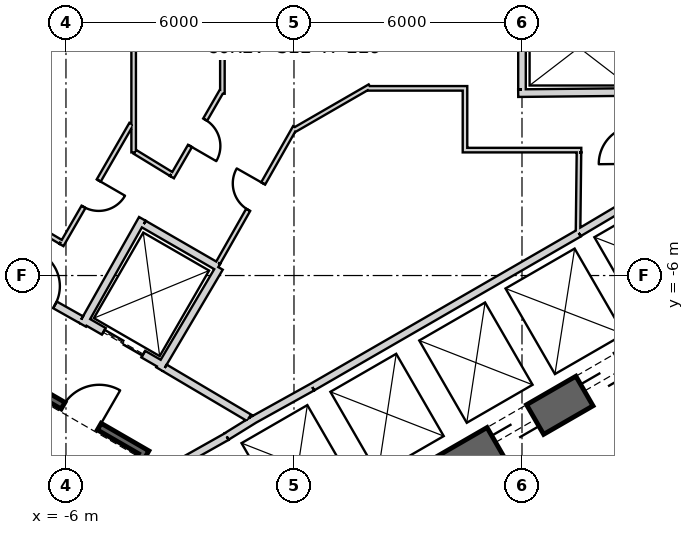
"""IFC4 building model, lengths in metres.
Left out: names, types, materials, properties, quantities, classifications, styles, units other than length and angle.
Written with IfcOpenShell. Run it as: python <this file> out.ifc"""

import sys

from ifc_helpers import new_model, si_unit, direction, frame, frame_2d, origin, place, context, subcontext, project, spatial, rectangle, extrude, element, fill, save


model = new_model("IFC4")
c1 = context("Model", 3, precision=1e-05, world=origin(), true_north=direction((0.0, 1.0)))
c2 = subcontext(c1, "Body", "Model", "MODEL_VIEW")
j1 = project(units=[si_unit("LENGTHUNIT", "METRE"), si_unit("PLANEANGLEUNIT", "RADIAN")], contexts=[c1])
p1 = place(None, origin())
s1 = spatial("IfcSite", under=j1, at=p1, CompositionType="ELEMENT")
p2 = place(p1, origin())
s2 = spatial("IfcBuilding", under=s1, at=p2, CompositionType="ELEMENT")
p3 = place(p2, frame((0.0, 0.0, 265.2)))
s3 = spatial("IfcBuildingStorey", under=s2, at=p3, CompositionType="ELEMENT", Elevation=265.2)
p4 = place(p3, frame((-7.825, -17.97, 0.0), z_axis=(0.0, 0.0, 1.0), x_axis=(0.866028369851, 0.499994862586, 0.0)))
e1 = element("IfcWall", 1, at=p4, inside=s3, PredefinedType="SHEAR", context=c2, shape_type="SweptSolid", body=[
    extrude(rectangle(XDim=31.523, YDim=0.9, at=frame_2d((15.762, 0.0))), origin(), (0.0, 0.0, 1.0), 4.0),
])
p5 = place(p4, frame((7.062, 0.0, 0.0)))
e2 = element("IfcOpeningElement", 2, at=p5, cuts=e1, PredefinedType="OPENING", context=c2, shape_type="SweptSolid", body=[
    extrude(rectangle(XDim=1.2, YDim=2.4, at=frame_2d((0.6, 1.2))), frame((0.0, 0.46, 0.0), z_axis=(0.0, -1.0, 0.0), x_axis=(1.0, 0.0, 0.0)), (0.0, 0.0, 1.0), 0.92),
])
p6 = place(p4, frame((9.762, 0.0, 0.0)))
e3 = element("IfcOpeningElement", 3, at=p6, cuts=e1, PredefinedType="OPENING", context=c2, shape_type="SweptSolid", body=[
    extrude(rectangle(XDim=1.2, YDim=2.4, at=frame_2d((0.6, 1.2))), frame((0.0, 0.46, 0.0), z_axis=(0.0, -1.0, 0.0), x_axis=(1.0, 0.0, 0.0)), (0.0, 0.0, 1.0), 0.92),
])
p7 = place(p4, frame((12.462, 0.0, 0.0)))
e4 = element("IfcOpeningElement", 4, at=p7, cuts=e1, PredefinedType="OPENING", context=c2, shape_type="SweptSolid", body=[
    extrude(rectangle(XDim=1.2, YDim=2.4, at=frame_2d((0.6, 1.2))), frame((0.0, 0.46, 0.0), z_axis=(0.0, -1.0, 0.0), x_axis=(1.0, 0.0, 0.0)), (0.0, 0.0, 1.0), 0.92),
])
p8 = place(p4, frame((15.162, 0.0, 0.0)))
e5 = element("IfcOpeningElement", 5, at=p8, cuts=e1, PredefinedType="OPENING", context=c2, shape_type="SweptSolid", body=[
    extrude(rectangle(XDim=1.2, YDim=2.4, at=frame_2d((0.6, 1.2))), frame((0.0, 0.46, 0.0), z_axis=(0.0, -1.0, 0.0), x_axis=(1.0, 0.0, 0.0)), (0.0, 0.0, 1.0), 0.92),
])
p9 = place(p4, frame((17.862, 0.0, 0.0)))
e6 = element("IfcOpeningElement", 6, at=p9, cuts=e1, PredefinedType="OPENING", context=c2, shape_type="SweptSolid", body=[
    extrude(rectangle(XDim=1.2, YDim=2.4, at=frame_2d((0.6, 1.2))), frame((0.0, 0.46, 0.0), z_axis=(0.0, -1.0, 0.0), x_axis=(1.0, 0.0, 0.0)), (0.0, 0.0, 1.0), 0.92),
])
p10 = place(p4, frame((20.562, 0.0, 0.0)))
e7 = element("IfcOpeningElement", 7, at=p10, cuts=e1, PredefinedType="OPENING", context=c2, shape_type="SweptSolid", body=[
    extrude(rectangle(XDim=1.2, YDim=2.4, at=frame_2d((0.6, 1.2))), frame((0.0, 0.46, 0.0), z_axis=(0.0, -1.0, 0.0), x_axis=(1.0, 0.0, 0.0)), (0.0, 0.0, 1.0), 0.92),
])
p11 = place(p4, frame((26.712, 0.0, 0.0)))
e8 = element("IfcOpeningElement", 8, at=p11, cuts=e1, PredefinedType="OPENING", context=c2, shape_type="SweptSolid", body=[
    extrude(rectangle(XDim=1.2, YDim=2.4, at=frame_2d((0.6, 1.2))), frame((0.0, 0.46, 0.0), z_axis=(0.0, -1.0, 0.0), x_axis=(1.0, 0.0, 0.0)), (0.0, 0.0, 1.0), 0.92),
])
p12 = place(p4, frame((3.612, 0.0, 0.0)))
e9 = element("IfcOpeningElement", 9, at=p12, cuts=e1, PredefinedType="OPENING", context=c2, shape_type="SweptSolid", body=[
    extrude(rectangle(XDim=1.2, YDim=2.4, at=frame_2d((0.6, 1.2))), frame((0.0, 0.46, 0.0), z_axis=(0.0, -1.0, 0.0), x_axis=(1.0, 0.0, 0.0)), (0.0, 0.0, 1.0), 0.92),
])
p13 = place(p3, frame((0.483, -8.936, 0.0), z_axis=(0.0, 0.0, 1.0), x_axis=(0.866030989016, 0.499990325971, 0.0)))
e10 = element("IfcWall", 10, at=p13, inside=s3, PredefinedType="PLUMBINGWALL", context=c2, shape_type="SweptSolid", body=[
    extrude(rectangle(XDim=8.1, YDim=0.2, at=frame_2d((4.05, 0.0))), origin(), (0.0, 0.0, 1.0), 3.7),
])
p14 = place(p3, frame((7.493, -4.878, 0.0), z_axis=(0.0, 0.0, 1.0), x_axis=(0.859981807212, 0.510324691999, 0.0)))
e11 = element("IfcWall", 11, at=p14, inside=s3, PredefinedType="PLUMBINGWALL", context=c2, shape_type="SweptSolid", body=[
    extrude(rectangle(XDim=1.845, YDim=0.2, at=frame_2d((0.922, 0.0))), origin(), (0.0, 0.0, 1.0), 3.7),
])
p15 = place(p3, frame((-1.769, -10.237, 0.0), z_axis=(0.0, 0.0, 1.0), x_axis=(-0.871534483978, -0.490334215854, 0.0)))
e12 = element("IfcWall", 12, at=p15, inside=s3, PredefinedType="PLUMBINGWALL", context=c2, shape_type="SweptSolid", body=[
    extrude(rectangle(XDim=2.7, YDim=0.2, at=frame_2d((1.35, 0.0))), origin(), (0.0, 0.0, 1.0), 3.7),
])
p16 = place(p3, frame((-1.024, -9.771, 0.0), z_axis=(0.0, 0.0, 1.0), x_axis=(-0.850348075135, -0.526220629693, 0.0)))
e13 = element("IfcWall", 13, at=p16, inside=s3, PredefinedType="PLUMBINGWALL", context=c2, shape_type="SweptSolid", body=[
    extrude(rectangle(XDim=0.878, YDim=0.2, at=frame_2d((0.439, 0.0))), origin(), (0.0, 0.0, 1.0), 3.7),
])
p17 = place(p3, frame((-1.13, -9.831, 0.0), z_axis=(0.0, 0.0, 1.0), x_axis=(0.874269620932, 0.485440655401, 0.0)))
e14 = element("IfcWall", 14, at=p17, inside=s3, PredefinedType="PLUMBINGWALL", context=c2, shape_type="SweptSolid", body=[
    extrude(rectangle(XDim=1.845, YDim=0.2, at=frame_2d((0.922, 0.0))), origin(), (0.0, 0.0, 1.0), 3.7),
])
p18 = place(p3, frame((5.9, -1.201, 0.0), z_axis=(0.0, 0.0, 1.0), x_axis=(0.999950064753, 0.009993397809, 0.0)))
e15 = element("IfcWall", 15, at=p18, inside=s3, PredefinedType="PLUMBINGWALL", context=c2, shape_type="SweptSolid", body=[
    extrude(rectangle(XDim=3.2, YDim=0.2, at=frame_2d((1.6, 0.0))), origin(), (0.0, 0.0, 1.0), 3.7),
])
p19 = place(p3, frame((6.0, -1.1, 0.0), z_axis=(0.0, 0.0, 1.0), x_axis=(0.0, 1.0, 0.0)))
e16 = element("IfcWall", 16, at=p19, inside=s3, PredefinedType="PLUMBINGWALL", context=c2, shape_type="SweptSolid", body=[
    extrude(rectangle(XDim=2.28, YDim=0.2, at=frame_2d((1.14, 0.0))), origin(), (0.0, 0.0, 1.0), 3.7),
])
p20 = place(p3, frame((-3.905, -10.563, -0.3), z_axis=(0.0, 0.0, 1.0), x_axis=(-0.500012932018, -0.866017937352, 0.0)))
e17 = element("IfcWall", 17, at=p20, inside=s3, PredefinedType="SHEAR", context=c2, shape_type="SweptSolid", body=[
    extrude(rectangle(XDim=8.1, YDim=0.2, at=frame_2d((4.05, 0.0))), origin(), (0.0, 0.0, 1.0), 4.0),
])
p21 = place(p3, frame((-4.041, -10.599, -0.3), z_axis=(0.0, 0.0, 1.0), x_axis=(-0.866047807691, 0.499961193289, 0.0)))
e18 = element("IfcWall", 18, at=p21, inside=s3, PredefinedType="SHEAR", context=c2, shape_type="SweptSolid", body=[
    extrude(rectangle(XDim=3.6, YDim=0.2, at=frame_2d((1.8, 0.0))), origin(), (0.0, 0.0, 1.0), 4.0),
])
p22 = place(p21, frame((1.25, 0.0, 0.3)))
e19 = element("IfcOpeningElement", 19, at=p22, cuts=e18, PredefinedType="OPENING", context=c2, shape_type="SweptSolid", body=[
    extrude(rectangle(XDim=1.1, YDim=2.1, at=frame_2d((0.55, 1.05))), frame((0.0, 0.11, 0.0), z_axis=(0.0, -1.0, 0.0), x_axis=(1.0, 0.0, 0.0)), (0.0, 0.0, 1.0), 0.22),
])
p23 = place(p3, frame((-3.446, -8.368, 0.0), z_axis=(0.0, 0.0, 1.0), x_axis=(-0.866024647952, 0.500001309137, 0.0)))
e20 = element("IfcWall", 20, at=p23, inside=s3, PredefinedType="PLUMBINGWALL", context=c2, shape_type="SweptSolid", body=[
    extrude(rectangle(XDim=2.4, YDim=0.2, at=frame_2d((1.2, 0.0))), origin(), (0.0, 0.0, 1.0), 3.7),
])
p24 = place(p23, frame((0.6, 0.0, 0.0)))
e21 = element("IfcOpeningElement", 21, at=p24, cuts=e20, PredefinedType="OPENING", context=c2, shape_type="SweptSolid", body=[
    extrude(rectangle(XDim=1.2, YDim=2.4, at=frame_2d((0.6, 1.2))), frame((0.0, 0.11, 0.0), z_axis=(0.0, -1.0, 0.0), x_axis=(1.0, 0.0, 0.0)), (0.0, 0.0, 1.0), 0.22),
])
p25 = place(p3, frame((-1.961, -5.796, 0.0), z_axis=(0.0, 0.0, 1.0), x_axis=(-0.508647062354, -0.860975125052, 0.0)))
e22 = element("IfcWall", 22, at=p25, inside=s3, PredefinedType="PLUMBINGWALL", context=c2, shape_type="SweptSolid", body=[
    extrude(rectangle(XDim=3.1, YDim=0.2, at=frame_2d((1.55, 0.0))), origin(), (0.0, 0.0, 1.0), 3.7),
])
p26 = place(p3, frame((-3.99, -4.509, 0.0), z_axis=(0.0, 0.0, 1.0), x_axis=(-0.491358283181, -0.870957540612, 0.0)))
e23 = element("IfcWall", 23, at=p26, inside=s3, PredefinedType="PLUMBINGWALL", context=c2, shape_type="SweptSolid", body=[
    extrude(rectangle(XDim=3.2, YDim=0.2, at=frame_2d((1.6, 0.0))), origin(), (0.0, 0.0, 1.0), 3.7),
])
p27 = place(p3, frame((-3.953, -4.646, 0.0), z_axis=(0.0, 0.0, 1.0), x_axis=(0.866065302921, -0.4999308863, 0.0)))
e24 = element("IfcWall", 24, at=p27, inside=s3, PredefinedType="PLUMBINGWALL", context=c2, shape_type="SweptSolid", body=[
    extrude(rectangle(XDim=2.264, YDim=0.2, at=frame_2d((1.132, 0.0))), origin(), (0.0, 0.0, 1.0), 3.7),
])
p28 = place(p3, frame((-3.401, -8.43, 0.0), z_axis=(0.0, 0.0, 1.0), x_axis=(0.860615607571, -0.509255118781, 0.0)))
e25 = element("IfcWall", 25, at=p28, inside=s3, PredefinedType="PARTITIONING", context=c2, shape_type="SweptSolid", body=[
    extrude(rectangle(XDim=2.581, YDim=0.2, at=frame_2d((1.29, 0.0))), origin(), (0.0, 0.0, 1.0), 3.7),
])
p29 = place(p3, frame((-7.849, -5.894, 0.0), z_axis=(0.0, 0.0, 1.0), x_axis=(0.871363259478, -0.490638431059, 0.0)))
e26 = element("IfcWall", 26, at=p29, inside=s3, PredefinedType="PARTITIONING", context=c2, shape_type="SweptSolid", body=[
    extrude(rectangle(XDim=2.581, YDim=0.2, at=frame_2d((1.291, 0.0))), origin(), (0.0, 0.0, 1.0), 3.7),
])
p30 = place(p29, frame((0.791, 0.0, 0.0)))
e27 = element("IfcOpeningElement", 27, at=p30, cuts=e26, PredefinedType="OPENING", context=c2, shape_type="SweptSolid", body=[
    extrude(rectangle(XDim=1.0, YDim=2.1, at=frame_2d((0.5, 1.05))), frame((0.0, 0.11, 0.0), z_axis=(0.0, -1.0, 0.0), x_axis=(1.0, 0.0, 0.0)), (0.0, 0.0, 1.0), 0.22),
])
p31 = place(p3, frame((0.029, -2.099, 0.0), z_axis=(0.0, 0.0, 1.0), x_axis=(-0.49376265119, -0.869596713592, 0.0)))
e28 = element("IfcWall", 28, at=p31, inside=s3, PredefinedType="PARTITIONING", context=c2, shape_type="SweptSolid", body=[
    extrude(rectangle(XDim=4.097, YDim=0.12, at=frame_2d((2.048, 0.0))), origin(), (0.0, 0.0, 1.0), 3.7),
])
p32 = place(p31, frame((1.7, 0.0, 0.0)))
e29 = element("IfcOpeningElement", 29, at=p32, cuts=e28, PredefinedType="OPENING", context=c2, shape_type="SweptSolid", body=[
    extrude(rectangle(XDim=0.8, YDim=2.1, at=frame_2d((0.4, 1.05))), frame((0.0, 0.07, 0.0), z_axis=(0.0, -1.0, 0.0), x_axis=(1.0, 0.0, 0.0)), (0.0, 0.0, 1.0), 0.14),
])
p33 = place(p3, frame((1.995, -1.023, 0.0), z_axis=(0.0, 0.0, 1.0), x_axis=(-0.866043041921, -0.499969448606, 0.0)))
e30 = element("IfcWall", 30, at=p33, inside=s3, PredefinedType="PARTITIONING", context=c2, shape_type="SweptSolid", body=[
    extrude(rectangle(XDim=2.31, YDim=0.12, at=frame_2d((1.155, 0.0))), origin(), (0.0, 0.0, 1.0), 3.7),
])
p34 = place(p3, frame((4.56, -1.075, 0.0), z_axis=(0.0, 0.0, 1.0), x_axis=(-1.0, 0.0, 0.0)))
e31 = element("IfcWall", 31, at=p34, inside=s3, PredefinedType="PARTITIONING", context=c2, shape_type="SweptSolid", body=[
    extrude(rectangle(XDim=2.636, YDim=0.12, at=frame_2d((1.318, 0.0))), origin(), (0.0, 0.0, 1.0), 3.7),
])
p35 = place(p3, frame((4.5, -2.76, 0.0), z_axis=(0.0, 0.0, 1.0), x_axis=(0.0, 1.0, 0.0)))
e32 = element("IfcWall", 32, at=p35, inside=s3, PredefinedType="PARTITIONING", context=c2, shape_type="SweptSolid", body=[
    extrude(rectangle(XDim=1.625, YDim=0.12, at=frame_2d((0.812, 0.0))), origin(), (0.0, 0.0, 1.0), 3.7),
])
p36 = place(p3, frame((7.56, -2.7, 0.0), z_axis=(0.0, 0.0, 1.0), x_axis=(-1.0, 0.0, 0.0)))
e33 = element("IfcWall", 33, at=p36, inside=s3, PredefinedType="PARTITIONING", context=c2, shape_type="SweptSolid", body=[
    extrude(rectangle(XDim=3.0, YDim=0.12, at=frame_2d((1.5, 0.0))), origin(), (0.0, 0.0, 1.0), 3.7),
])
p37 = place(p3, frame((7.475, -4.865, 0.0), z_axis=(0.0, 0.0, 1.0), x_axis=(0.011716133148, 0.999931363757, 0.0)))
e34 = element("IfcWall", 34, at=p37, inside=s3, PredefinedType="PARTITIONING", context=c2, shape_type="SweptSolid", body=[
    extrude(rectangle(XDim=2.105, YDim=0.12, at=frame_2d((1.052, 0.0))), origin(), (0.0, 0.0, 1.0), 3.7),
])
p38 = place(p3, frame((-4.219, -2.76, 0.0), z_axis=(0.0, 0.0, 1.0), x_axis=(0.0, 1.0, 0.0)))
e35 = element("IfcWall", 35, at=p38, inside=s3, PredefinedType="PARTITIONING", context=c2, shape_type="SweptSolid", body=[
    extrude(rectangle(XDim=5.521, YDim=0.12, at=frame_2d((2.76, 0.0))), origin(), (0.0, 0.0, 1.0), 3.7),
])
p39 = place(p3, frame((-6.118, -5.197, 0.0), z_axis=(0.0, 0.0, 1.0), x_axis=(0.499979045085, 0.866037501772, 0.0)))
e36 = element("IfcWall", 36, at=p39, inside=s3, PredefinedType="PARTITIONING", context=c2, shape_type="SweptSolid", body=[
    extrude(rectangle(XDim=3.679, YDim=0.12, at=frame_2d((1.839, 0.0))), origin(), (0.0, 0.0, 1.0), 3.7),
])
p40 = place(p39, frame((1.16, 0.0, 0.0)))
e37 = element("IfcOpeningElement", 37, at=p40, cuts=e36, PredefinedType="OPENING", context=c2, shape_type="SweptSolid", body=[
    extrude(rectangle(XDim=0.8, YDim=2.1, at=frame_2d((0.4, 1.05))), frame((0.0, 0.07, 0.0), z_axis=(0.0, -1.0, 0.0), x_axis=(1.0, 0.0, 0.0)), (0.0, 0.0, 1.0), 0.14),
])
p41 = place(p3, frame((-7.95, -4.041, 0.0), z_axis=(0.0, 0.0, 1.0), x_axis=(0.860112457103, -0.510104461004, 0.0)))
e38 = element("IfcWall", 38, at=p41, inside=s3, PredefinedType="PARTITIONING", context=c2, shape_type="SweptSolid", body=[
    extrude(rectangle(XDim=2.104, YDim=0.12, at=frame_2d((1.052, 0.0))), origin(), (0.0, 0.0, 1.0), 3.7),
])
p42 = place(p3, frame((-1.884, -1.216, 0.0), z_axis=(0.0, 0.0, 1.0), x_axis=(0.0, 1.0, 0.0)))
e39 = element("IfcWall", 39, at=p42, inside=s3, PredefinedType="PARTITIONING", context=c2, shape_type="SweptSolid", body=[
    extrude(rectangle(XDim=2.31, YDim=0.12, at=frame_2d((1.155, 0.0))), origin(), (0.0, 0.0, 1.0), 3.7),
])
p43 = place(p3, frame((-3.211, -3.412, 0.0), z_axis=(0.0, 0.0, 1.0), x_axis=(0.500013727357, 0.866017478146, 0.0)))
e40 = element("IfcWall", 40, at=p43, inside=s3, PredefinedType="PARTITIONING", context=c2, shape_type="SweptSolid", body=[
    extrude(rectangle(XDim=2.636, YDim=0.12, at=frame_2d((1.318, 0.0))), origin(), (0.0, 0.0, 1.0), 3.7),
])
p44 = place(p43, frame((0.948, 0.0, 0.0)))
e41 = element("IfcOpeningElement", 41, at=p44, cuts=e40, PredefinedType="OPENING", context=c2, shape_type="SweptSolid", body=[
    extrude(rectangle(XDim=0.8, YDim=2.1, at=frame_2d((0.4, 1.05))), frame((0.0, 0.07, 0.0), z_axis=(0.0, -1.0, 0.0), x_axis=(1.0, 0.0, 0.0)), (0.0, 0.0, 1.0), 0.14),
])
p45 = place(p3, frame((-4.189, -2.744, 0.0), z_axis=(0.0, 0.0, 1.0), x_axis=(0.853217230587, -0.521555708845, 0.0)))
e42 = element("IfcWall", 42, at=p45, inside=s3, PredefinedType="PARTITIONING", context=c2, shape_type="SweptSolid", body=[
    extrude(rectangle(XDim=1.121, YDim=0.12, at=frame_2d((0.561, 0.0))), origin(), (0.0, 0.0, 1.0), 3.7),
])
p46 = place(p22, origin())
e43 = element("IfcDoor", 43, at=p46, inside=s3, OperationType="SINGLE_SWING_RIGHT", PredefinedType="USERDEFINED", context=c2, shape_type="SweptSolid", body=[
    extrude(rectangle(XDim=1.1, YDim=2.1, at=frame_2d((0.55, 1.05))), frame((0.0, 0.025, 0.0), z_axis=(0.0, -1.0, 0.0), x_axis=(1.0, 0.0, 0.0)), (0.0, 0.0, 1.0), 0.05),
])
fill(e19, e43)
p47 = place(p30, origin())
e44 = element("IfcDoor", 44, at=p47, inside=s3, OperationType="SINGLE_SWING_RIGHT", PredefinedType="USERDEFINED", context=c2, shape_type="SweptSolid", body=[
    extrude(rectangle(XDim=1.0, YDim=2.1, at=frame_2d((0.5, 1.05))), frame((0.0, 0.025, 0.0), z_axis=(0.0, -1.0, 0.0), x_axis=(1.0, 0.0, 0.0)), (0.0, 0.0, 1.0), 0.05),
])
fill(e27, e44)
p48 = place(p24, origin())
e45 = element("IfcDoor", 45, at=p48, inside=s3, OperationType="SLIDING_TO_LEFT", PredefinedType="USERDEFINED", context=c2, shape_type="SweptSolid", body=[
    extrude(rectangle(XDim=1.2, YDim=2.4, at=frame_2d((0.6, 1.2))), frame((0.0, 0.025, 0.0), z_axis=(0.0, -1.0, 0.0), x_axis=(1.0, 0.0, 0.0)), (0.0, 0.0, 1.0), 0.05),
])
fill(e21, e45)
p49 = place(p32, origin())
e46 = element("IfcDoor", 46, at=p49, inside=s3, OperationType="SINGLE_SWING_RIGHT", PredefinedType="USERDEFINED", context=c2, shape_type="SweptSolid", body=[
    extrude(rectangle(XDim=0.8, YDim=2.1, at=frame_2d((0.4, 1.05))), frame((0.0, 0.025, 0.0), z_axis=(0.0, -1.0, 0.0), x_axis=(1.0, 0.0, 0.0)), (0.0, 0.0, 1.0), 0.05),
])
fill(e29, e46)
p50 = place(p40, origin())
e47 = element("IfcDoor", 47, at=p50, inside=s3, OperationType="SINGLE_SWING_LEFT", PredefinedType="USERDEFINED", context=c2, shape_type="SweptSolid", body=[
    extrude(rectangle(XDim=0.8, YDim=2.1, at=frame_2d((0.4, 1.05))), frame((0.0, 0.025, 0.0), z_axis=(0.0, -1.0, 0.0), x_axis=(1.0, 0.0, 0.0)), (0.0, 0.0, 1.0), 0.05),
])
fill(e37, e47)
p51 = place(p44, origin())
e48 = element("IfcDoor", 48, at=p51, inside=s3, OperationType="SINGLE_SWING_RIGHT", PredefinedType="USERDEFINED", context=c2, shape_type="SweptSolid", body=[
    extrude(rectangle(XDim=0.8, YDim=2.1, at=frame_2d((0.4, 1.05))), frame((0.0, 0.025, 0.0), z_axis=(0.0, -1.0, 0.0), x_axis=(1.0, 0.0, 0.0)), (0.0, 0.0, 1.0), 0.05),
])
fill(e41, e48)
p52 = place(p8, origin())
e49 = element("IfcDoor", 49, at=p52, inside=s3, OperationType="SLIDING_TO_LEFT", PredefinedType="USERDEFINED", context=c2, shape_type="SweptSolid", body=[
    extrude(rectangle(XDim=1.2, YDim=2.4, at=frame_2d((0.6, 1.2))), frame((0.0, 0.025, 0.0), z_axis=(0.0, -1.0, 0.0), x_axis=(1.0, 0.0, 0.0)), (0.0, 0.0, 1.0), 0.05),
])
fill(e5, e49)
p53 = place(p9, origin())
e50 = element("IfcDoor", 50, at=p53, inside=s3, OperationType="SLIDING_TO_LEFT", PredefinedType="USERDEFINED", context=c2, shape_type="SweptSolid", body=[
    extrude(rectangle(XDim=1.2, YDim=2.4, at=frame_2d((0.6, 1.2))), frame((0.0, 0.025, 0.0), z_axis=(0.0, -1.0, 0.0), x_axis=(1.0, 0.0, 0.0)), (0.0, 0.0, 1.0), 0.05),
])
fill(e6, e50)
save(model, sys.argv[1])
